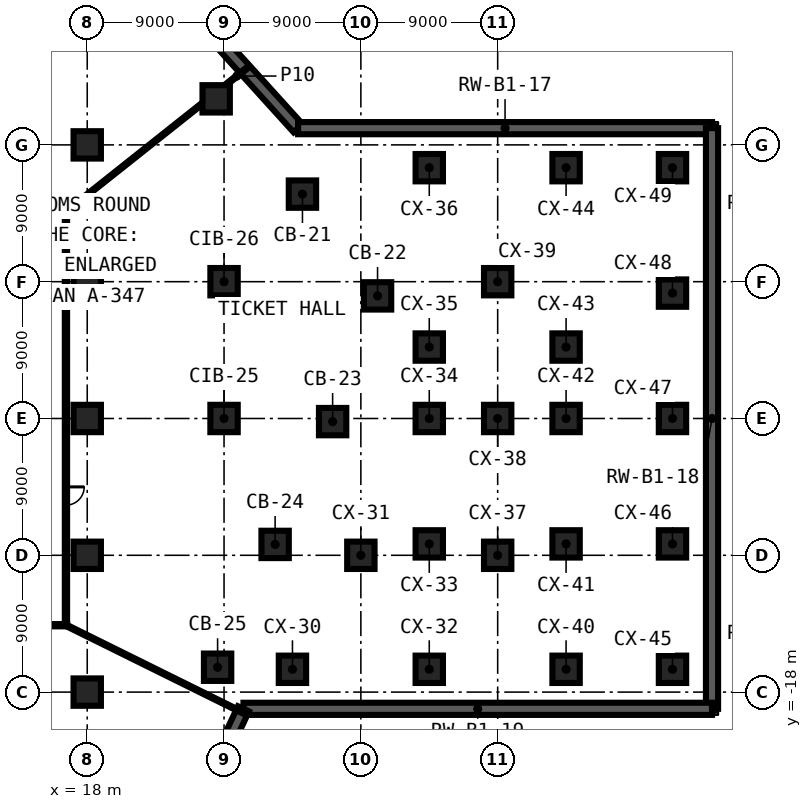
"""IFC4 building model, lengths in metres.
Left out: names, types, materials, properties, quantities, classifications, styles, units other than length and angle.
Written with IfcOpenShell. Run it as: python <this file> out.ifc"""

import sys

from ifc_helpers import new_model, si_unit, direction, frame, frame_2d, origin, origin_2d, place, context, subcontext, project, spatial, rectangle, extrude, element, fill, save


model = new_model("IFC4")
c1 = context("Model", 3, precision=1e-05, world=origin(), true_north=direction((0.0, 1.0)))
c2 = subcontext(c1, "Body", "Model", "MODEL_VIEW")
j1 = project(units=[si_unit("LENGTHUNIT", "METRE"), si_unit("PLANEANGLEUNIT", "RADIAN")], contexts=[c1])
p1 = place(None, origin())
s1 = spatial("IfcSite", under=j1, at=p1, CompositionType="ELEMENT")
p2 = place(p1, origin())
s2 = spatial("IfcBuilding", under=s1, at=p2, CompositionType="ELEMENT")
p3 = place(p2, frame((0.0, 0.0, -6.0)))
s3 = spatial("IfcBuildingStorey", under=s2, at=p3, CompositionType="ELEMENT", Elevation=-6.0)
for number, where, z_axis, x_axis in (
    (1, (26.482, 21.029, 0.0), (0.0, 0.0, 1.0), (1.0, 0.0, 0.0)),
    (2, (32.158, 14.761, 0.0), (0.0, 0.0, 1.0), (1.0, 0.0, 0.0)),
    (3, (37.098, 8.066, 0.0), (0.0, 0.0, 1.0), (1.0, 0.0, 0.0)),
    (4, (34.143, -0.205, 0.0), (0.0, 0.0, 1.0), (1.0, 0.0, 0.0)),
    (5, (30.36, -8.284, 0.0), (0.0, 0.0, 1.0), (1.0, 0.0, 0.0)),
    (6, (26.576, -16.364, 0.0), (0.0, 0.0, 1.0), (1.0, 0.0, 0.0)),
    (7, (18.0, -18.0, 0.0), (0.0, 0.0, 1.0), (1.0, 0.0, 0.0)),
    (8, (18.0, -9.0, 0.0), (0.0, 0.0, 1.0), (1.0, 0.0, 0.0)),
    (9, (18.0, 0.0, 0.0), (0.0, 0.0, 1.0), (1.0, 0.0, 0.0)),
    (10, (18.0, 9.0, 0.0), (0.0, 0.0, 1.0), (1.0, 0.0, 0.0)),
    (11, (18.0, 18.0, 0.0), (0.0, 0.0, 1.0), (1.0, 0.0, 0.0)),
    (12, (27.0, 0.0, 0.0), (0.0, 0.0, 1.0), (1.0, 0.0, 0.0)),
    (13, (27.0, 9.0, 0.0), (0.0, 0.0, 1.0), (1.0, 0.0, 0.0)),
    (14, (31.5, -16.5, 0.0), (0.0, 0.0, 1.0), (1.0, 0.0, 0.0)),
    (15, (36.0, -9.0, 0.0), (0.0, 0.0, 1.0), (1.0, 0.0, 0.0)),
    (16, (40.5, -16.5, 0.0), (0.0, 0.0, 1.0), (1.0, 0.0, 0.0)),
    (17, (40.5, -8.25, 0.0), (0.0, 0.0, 1.0), (1.0, 0.0, 0.0)),
    (18, (40.5, 0.0, 0.0), (0.0, 0.0, 1.0), (1.0, 0.0, 0.0)),
    (19, (40.5, 4.7, 0.0), (0.0, 0.0, 1.0), (1.0, 0.0, 0.0)),
    (20, (40.5, 16.5, 0.0), (0.0, 0.0, 1.0), (1.0, 0.0, 0.0)),
    (21, (45.0, -9.0, 0.0), (0.0, 0.0, 1.0), (1.0, 0.0, 0.0)),
    (22, (45.0, 0.0, 0.0), (0.0, 0.0, 1.0), (1.0, 0.0, 0.0)),
    (23, (45.0, 9.0, 0.0), (0.0, 0.0, 1.0), (1.0, 0.0, 0.0)),
    (24, (49.5, -16.5, 0.0), (0.0, 0.0, 1.0), (1.0, 0.0, 0.0)),
    (25, (49.5, -8.25, 0.0), (0.0, 0.0, 1.0), (1.0, 0.0, 0.0)),
    (26, (49.5, 0.0, 0.0), (0.0, 0.0, 1.0), (1.0, 0.0, 0.0)),
    (27, (49.5, 4.7, 0.0), (0.0, 0.0, 1.0), (1.0, 0.0, 0.0)),
    (28, (49.5, 16.5, 0.0), (0.0, 0.0, 1.0), (1.0, 0.0, 0.0)),
    (29, (56.5, -16.5, 0.0), (0.0, 0.0, 1.0), (1.0, 0.0, 0.0)),
    (30, (56.5, -8.25, 0.0), (0.0, 0.0, 1.0), (1.0, 0.0, 0.0)),
    (31, (56.5, 0.0, 0.0), (0.0, 0.0, 1.0), (1.0, 0.0, 0.0)),
    (32, (56.5, 8.25, 0.0), (0.0, 0.0, 1.0), (1.0, 0.0, 0.0)),
    (33, (56.5, 16.5, 0.0), (0.0, 0.0, 1.0), (1.0, 0.0, 0.0)),
):
    element("IfcColumn", number, at=place(p3, frame(where, z_axis=z_axis, x_axis=x_axis)), inside=s3, PredefinedType="COLUMN", context=c2, shape_type="SweptSolid", body=[
        extrude(rectangle(XDim=1.8, YDim=1.8, at=origin_2d()), origin(), (0.0, 0.0, 1.0), 5.55),
    ])
p4 = place(p3, frame((18.357, 34.022, 0.0), z_axis=(0.0, 0.0, 1.0), x_axis=(0.671253662178, -0.741227711983, 0.0)))
e34 = element("IfcWall", 34, at=p4, inside=s3, PredefinedType="SHEAR", context=c2, shape_type="SweptSolid", body=[
    extrude(rectangle(XDim=20.132, YDim=0.8, at=frame_2d((10.066, 0.0))), origin(), (0.0, 0.0, 1.0), 5.55),
])
p5 = place(p3, frame((31.871, 19.1, 0.0), z_axis=(0.0, 0.0, 1.0), x_axis=(1.0, 0.0, 0.0)))
e35 = element("IfcWall", 35, at=p5, inside=s3, PredefinedType="SHEAR", context=c2, shape_type="SweptSolid", body=[
    extrude(rectangle(XDim=27.229, YDim=0.8, at=frame_2d((13.615, 0.0))), origin(), (0.0, 0.0, 1.0), 5.55),
])
p6 = place(p3, frame((59.1, 19.1, 0.0), z_axis=(0.0, 0.0, 1.0), x_axis=(0.0, -1.0, 0.0)))
e36 = element("IfcWall", 36, at=p6, inside=s3, PredefinedType="SHEAR", context=c2, shape_type="SweptSolid", body=[
    extrude(rectangle(XDim=38.2, YDim=0.8, at=frame_2d((19.1, 0.0))), origin(), (0.0, 0.0, 1.0), 5.55),
])
p7 = place(p3, frame((59.1, -19.1, 0.0), z_axis=(0.0, 0.0, 1.0), x_axis=(-1.0, 0.0, 0.0)))
e37 = element("IfcWall", 37, at=p7, inside=s3, PredefinedType="SHEAR", context=c2, shape_type="SweptSolid", body=[
    extrude(rectangle(XDim=30.824, YDim=0.8, at=frame_2d((15.412, 0.0))), origin(), (0.0, 0.0, 1.0), 5.55),
])
p8 = place(p3, frame((28.276, -19.1, 0.0), z_axis=(0.0, 0.0, 1.0), x_axis=(-0.42412057434, -0.905605730118, 0.0)))
e38 = element("IfcWall", 38, at=p8, inside=s3, PredefinedType="SHEAR", context=c2, shape_type="SweptSolid", body=[
    extrude(rectangle(XDim=13.717, YDim=0.8, at=frame_2d((6.858, 0.0))), origin(), (0.0, 0.0, 1.0), 5.55),
])
p9 = place(p3, frame((16.675, -13.6, 0.0), z_axis=(0.0, 0.0, 1.0), x_axis=(-1.0, 0.0, 0.0)))
e39 = element("IfcWall", 39, at=p9, inside=s3, PredefinedType="PARTITIONING", context=c2, shape_type="SweptSolid", body=[
    extrude(rectangle(XDim=33.35, YDim=0.15, at=frame_2d((16.675, 0.0))), origin(), (0.0, 0.0, 1.0), 5.55),
])
p10 = place(p9, frame((27.775, 0.0, 0.0)))
e40 = element("IfcOpeningElement", 40, at=p10, cuts=e39, PredefinedType="OPENING", context=c2, shape_type="SweptSolid", body=[
    extrude(rectangle(XDim=1.8, YDim=2.4, at=frame_2d((0.9, 1.2))), frame((0.0, 0.085, 0.0), z_axis=(0.0, -1.0, 0.0), x_axis=(1.0, 0.0, 0.0)), (0.0, 0.0, 1.0), 0.17),
])
p11 = place(p9, frame((15.175, 0.0, 0.0)))
e41 = element("IfcOpeningElement", 41, at=p11, cuts=e39, PredefinedType="OPENING", context=c2, shape_type="SweptSolid", body=[
    extrude(rectangle(XDim=1.2, YDim=2.1, at=frame_2d((0.6, 1.05))), frame((0.0, 0.085, 0.0), z_axis=(0.0, -1.0, 0.0), x_axis=(1.0, 0.0, 0.0)), (0.0, 0.0, 1.0), 0.17),
])
p12 = place(p9, frame((3.025, 0.0, 0.0)))
e42 = element("IfcOpeningElement", 42, at=p12, cuts=e39, PredefinedType="OPENING", context=c2, shape_type="SweptSolid", body=[
    extrude(rectangle(XDim=1.2, YDim=2.1, at=frame_2d((0.6, 1.05))), frame((0.0, 0.085, 0.0), z_axis=(0.0, -1.0, 0.0), x_axis=(1.0, 0.0, 0.0)), (0.0, 0.0, 1.0), 0.17),
])
p13 = place(p3, frame((-16.675, 13.6, 0.0), z_axis=(0.0, 0.0, 1.0), x_axis=(1.0, 0.0, 0.0)))
e43 = element("IfcWall", 43, at=p13, inside=s3, PredefinedType="PARTITIONING", context=c2, shape_type="SweptSolid", body=[
    extrude(rectangle(XDim=33.35, YDim=0.15, at=frame_2d((16.675, 0.0))), origin(), (0.0, 0.0, 1.0), 5.55),
])
p14 = place(p13, frame((27.642, 0.0, 0.0)))
e44 = element("IfcOpeningElement", 44, at=p14, cuts=e43, PredefinedType="OPENING", context=c2, shape_type="SweptSolid", body=[
    extrude(rectangle(XDim=1.2, YDim=2.1, at=frame_2d((0.6, 1.05))), frame((0.0, 0.085, 0.0), z_axis=(0.0, -1.0, 0.0), x_axis=(1.0, 0.0, 0.0)), (0.0, 0.0, 1.0), 0.17),
])
p15 = place(p13, frame((19.317, 0.0, 0.0)))
e45 = element("IfcOpeningElement", 45, at=p15, cuts=e43, PredefinedType="OPENING", context=c2, shape_type="SweptSolid", body=[
    extrude(rectangle(XDim=1.2, YDim=2.1, at=frame_2d((0.6, 1.05))), frame((0.0, 0.085, 0.0), z_axis=(0.0, -1.0, 0.0), x_axis=(1.0, 0.0, 0.0)), (0.0, 0.0, 1.0), 0.17),
])
p16 = place(p13, frame((9.587, 0.0, 0.0)))
e46 = element("IfcOpeningElement", 46, at=p16, cuts=e43, PredefinedType="OPENING", context=c2, shape_type="SweptSolid", body=[
    extrude(rectangle(XDim=1.2, YDim=2.1, at=frame_2d((0.6, 1.05))), frame((0.0, 0.085, 0.0), z_axis=(0.0, -1.0, 0.0), x_axis=(1.0, 0.0, 0.0)), (0.0, 0.0, 1.0), 0.17),
])
p17 = place(p13, frame((2.099, 0.0, 0.0)))
e47 = element("IfcOpeningElement", 47, at=p17, cuts=e43, PredefinedType="OPENING", context=c2, shape_type="SweptSolid", body=[
    extrude(rectangle(XDim=1.2, YDim=2.1, at=frame_2d((0.6, 1.05))), frame((0.0, 0.085, 0.0), z_axis=(0.0, -1.0, 0.0), x_axis=(1.0, 0.0, 0.0)), (0.0, 0.0, 1.0), 0.17),
])
p18 = place(p3, frame((16.6, 13.6, 0.0), z_axis=(0.0, 0.0, 1.0), x_axis=(0.783150180029, 0.621832610531, 0.0)))
e48 = element("IfcWall", 48, at=p18, inside=s3, PredefinedType="PARTITIONING", context=c2, shape_type="SweptSolid", body=[
    extrude(rectangle(XDim=11.469, YDim=0.1, at=frame_2d((5.734, 0.0))), origin(), (0.0, 0.0, 1.0), 5.55),
])
p19 = place(p3, frame((27.091, 21.929, 0.0), z_axis=(0.0, 0.0, 1.0), x_axis=(0.783148932994, 0.621834181073, 0.0)))
e49 = element("IfcWall", 49, at=p19, inside=s3, PredefinedType="PARTITIONING", context=c2, shape_type="SweptSolid", body=[
    extrude(rectangle(XDim=1.928, YDim=0.1, at=frame_2d((0.964, 0.0))), origin(), (0.0, 0.0, 1.0), 5.55),
])
p20 = place(p3, frame((16.6, 13.525, 0.0), z_axis=(0.0, 0.0, 1.0), x_axis=(0.0, -1.0, 0.0)))
e50 = element("IfcWall", 50, at=p20, inside=s3, PredefinedType="PARTITIONING", context=c2, shape_type="SweptSolid", body=[
    extrude(rectangle(XDim=27.05, YDim=0.15, at=frame_2d((13.525, 0.0))), origin(), (0.0, 0.0, 1.0), 5.55),
])
p21 = place(p20, frame((18.025, 0.0, 0.0)))
e51 = element("IfcOpeningElement", 51, at=p21, cuts=e50, PredefinedType="OPENING", context=c2, shape_type="SweptSolid", body=[
    extrude(rectangle(XDim=1.2, YDim=2.1, at=frame_2d((0.6, 1.05))), frame((0.0, 0.085, 0.0), z_axis=(0.0, -1.0, 0.0), x_axis=(1.0, 0.0, 0.0)), (0.0, 0.0, 1.0), 0.17),
])
p22 = place(p3, frame((16.6, -13.6, 0.0), z_axis=(0.0, 0.0, 1.0), x_axis=(0.896402741042, -0.443240483093, 0.0)))
e52 = element("IfcWall", 52, at=p22, inside=s3, PredefinedType="PARTITIONING", context=c2, shape_type="SweptSolid", body=[
    extrude(rectangle(XDim=13.189, YDim=0.1, at=frame_2d((6.595, 0.0))), origin(), (0.0, 0.0, 1.0), 5.55),
])
p23 = place(p21, origin())
e53 = element("IfcDoor", 53, at=p23, inside=s3, OperationType="SINGLE_SWING_RIGHT", PredefinedType="DOOR", context=c2, shape_type="SweptSolid", body=[
    extrude(rectangle(XDim=1.2, YDim=2.1, at=frame_2d((0.6, 1.05))), frame((0.0, 0.025, 0.0), z_axis=(0.0, -1.0, 0.0), x_axis=(1.0, 0.0, 0.0)), (0.0, 0.0, 1.0), 0.05),
])
fill(e51, e53)
save(model, sys.argv[1])
